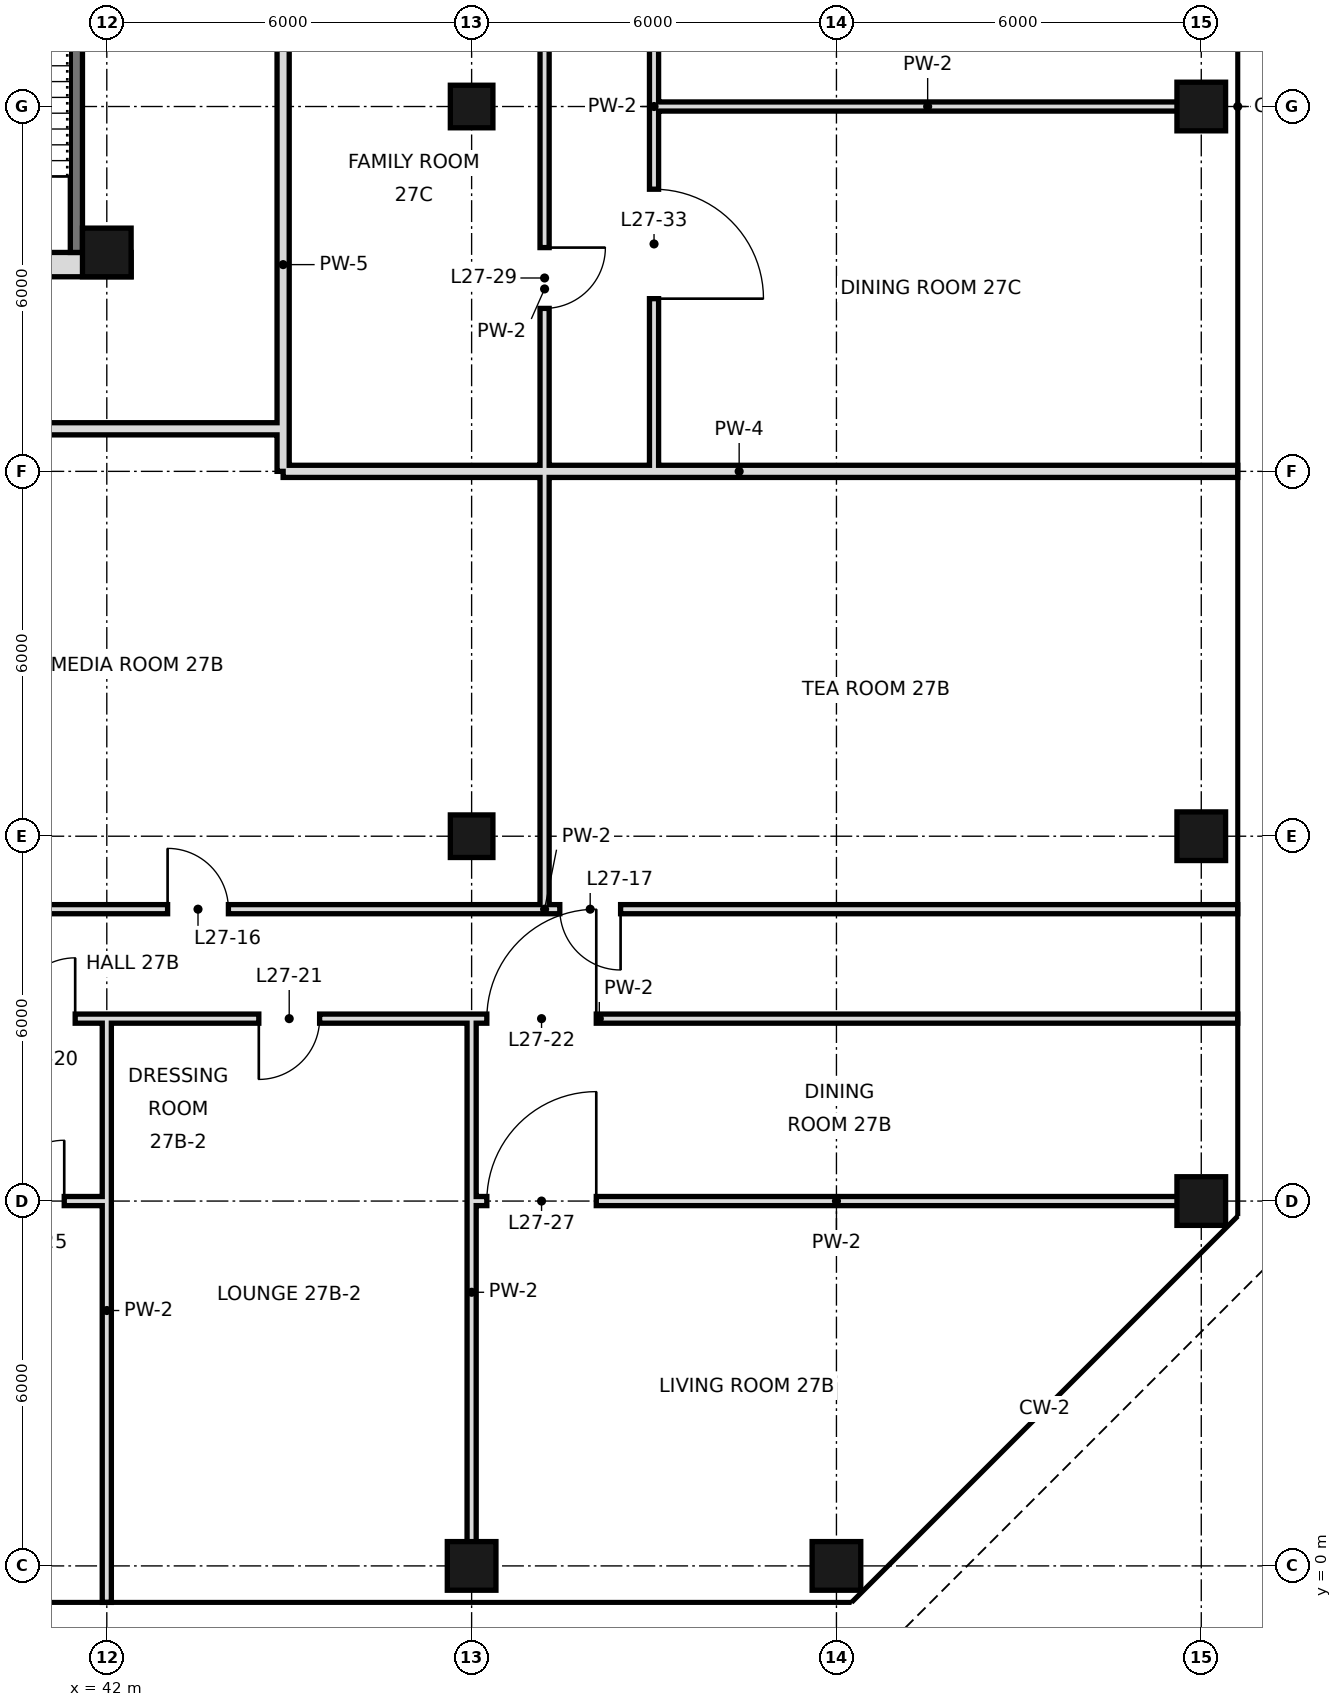
"""IFC4 building model, lengths in metres.
Left out: names, types, materials, properties, quantities, classifications, styles, units other than length and angle.
Written with IfcOpenShell. Run it as: python <this file> out.ifc"""

import sys

from ifc_helpers import new_model, si_unit, direction, frame, frame_2d, origin, origin_2d, place, context, subcontext, project, spatial, rectangle, hollow_rectangle, extrude, element, fill, save


model = new_model("IFC4")
c1 = context("Model", 3, precision=1e-05, world=origin(), true_north=direction((0.0, 1.0)))
c2 = subcontext(c1, "Body", "Model", "MODEL_VIEW")
j1 = project(units=[si_unit("LENGTHUNIT", "METRE"), si_unit("PLANEANGLEUNIT", "RADIAN")], contexts=[c1])
p1 = place(None, origin())
s1 = spatial("IfcSite", under=j1, at=p1, CompositionType="ELEMENT")
p2 = place(p1, origin())
s2 = spatial("IfcBuilding", under=s1, at=p2, CompositionType="ELEMENT")
p3 = place(p2, frame((0.0, 0.0, 123.2)))
s3 = spatial("IfcBuildingStorey", under=s2, at=p3, CompositionType="ELEMENT", Elevation=123.2)
p4 = place(p3, frame((42.0, 21.6, 0.0), z_axis=(0.0, 0.0, 1.0), x_axis=(1.0, 0.0, 0.0)))
e1 = element("IfcColumn", 1, at=p4, inside=s3, PredefinedType="COLUMN", context=c2, shape_type="SweptSolid", body=[
    extrude(hollow_rectangle(XDim=0.8, YDim=0.8, WallThickness=0.05, at=origin_2d()), origin(), (0.0, 0.0, 1.0), 3.6),
])
p5 = place(p3, frame((48.0, 0.0, 0.0), z_axis=(0.0, 0.0, 1.0), x_axis=(1.0, 0.0, 0.0)))
e2 = element("IfcColumn", 2, at=p5, inside=s3, PredefinedType="COLUMN", context=c2, shape_type="SweptSolid", body=[
    extrude(hollow_rectangle(XDim=0.8, YDim=0.8, WallThickness=0.04, at=origin_2d()), origin(), (0.0, 0.0, 1.0), 3.6),
])
for number, where, z_axis, x_axis in (
    (3, (48.0, 12.0, 0.0), (0.0, 0.0, 1.0), (1.0, 0.0, 0.0)),
    (4, (48.0, 24.0, 0.0), (0.0, 0.0, 1.0), (1.0, 0.0, 0.0)),
):
    element("IfcColumn", number, at=place(p3, frame(where, z_axis=z_axis, x_axis=x_axis)), inside=s3, PredefinedType="COLUMN", context=c2, shape_type="SweptSolid", body=[
        extrude(hollow_rectangle(XDim=0.7, YDim=0.7, WallThickness=0.036, at=origin_2d()), origin(), (0.0, 0.0, 1.0), 3.6),
    ])
for number, where, z_axis, x_axis in (
    (5, (54.0, 0.0, 0.0), (0.0, 0.0, 1.0), (1.0, 0.0, 0.0)),
    (6, (60.0, 6.0, 0.0), (0.0, 0.0, 1.0), (1.0, 0.0, 0.0)),
    (7, (60.0, 12.0, 0.0), (0.0, 0.0, 1.0), (1.0, 0.0, 0.0)),
    (8, (60.0, 24.0, 0.0), (0.0, 0.0, 1.0), (1.0, 0.0, 0.0)),
):
    element("IfcColumn", number, at=place(p3, frame(where, z_axis=z_axis, x_axis=x_axis)), inside=s3, PredefinedType="COLUMN", context=c2, shape_type="SweptSolid", body=[
        extrude(hollow_rectangle(XDim=0.8, YDim=0.8, WallThickness=0.04, at=origin_2d()), origin(), (0.0, 0.0, 1.0), 3.6),
    ])
p6 = place(p3, frame((42.0, -0.6, 0.0), z_axis=(0.0, 0.0, 1.0), x_axis=(0.0, 1.0, 0.0)))
e9 = element("IfcWall", 9, at=p6, inside=s3, PredefinedType="PARTITIONING", context=c2, shape_type="SweptSolid", body=[
    extrude(rectangle(XDim=9.6, YDim=0.15, at=frame_2d((4.8, 0.0))), origin(), (0.0, 0.0, 1.0), 2.72),
])
p7 = place(p3, frame((44.9, 18.7, 0.0), z_axis=(0.0, 0.0, 1.0), x_axis=(0.0, 1.0, 0.0)))
e10 = element("IfcWall", 10, at=p7, inside=s3, PredefinedType="SOLIDWALL", context=c2, shape_type="SweptSolid", body=[
    extrude(rectangle(XDim=14.9, YDim=0.2, at=frame_2d((7.45, 0.0))), origin(), (0.0, 0.0, 1.0), 2.97),
])
p8 = place(p7, frame((9.72, 0.0, 0.0)))
e11 = element("IfcOpeningElement", 11, at=p8, cuts=e10, PredefinedType="OPENING", context=c2, shape_type="SweptSolid", body=[
    extrude(rectangle(XDim=1.2, YDim=2.4, at=frame_2d((0.6, 1.2))), frame((0.0, 0.11, 0.0), z_axis=(0.0, -1.0, 0.0), x_axis=(1.0, 0.0, 0.0)), (0.0, 0.0, 1.0), 0.22),
])
p9 = place(p3, frame((44.9, 18.0, 0.0), z_axis=(0.0, 0.0, 1.0), x_axis=(0.0, 1.0, 0.0)))
e12 = element("IfcWall", 12, at=p9, inside=s3, PredefinedType="SOLIDWALL", context=c2, shape_type="SweptSolid", body=[
    extrude(rectangle(XDim=0.7, YDim=0.2, at=frame_2d((0.35, 0.0))), origin(), (0.0, 0.0, 1.0), 2.97),
])
p10 = place(p3, frame((48.0, 0.0, 0.0), z_axis=(0.0, 0.0, 1.0), x_axis=(0.0, 1.0, 0.0)))
e13 = element("IfcWall", 13, at=p10, inside=s3, PredefinedType="PARTITIONING", context=c2, shape_type="SweptSolid", body=[
    extrude(rectangle(XDim=9.0, YDim=0.15, at=frame_2d((4.5, 0.0))), origin(), (0.0, 0.0, 1.0), 2.72),
])
p11 = place(p3, frame((49.2, 10.8, 0.0), z_axis=(0.0, 0.0, 1.0), x_axis=(0.0, 1.0, 0.0)))
e14 = element("IfcWall", 14, at=p11, inside=s3, PredefinedType="PARTITIONING", context=c2, shape_type="SweptSolid", body=[
    extrude(rectangle(XDim=20.4, YDim=0.15, at=frame_2d((10.2, 0.0))), origin(), (0.0, 0.0, 1.0), 3.42),
])
p12 = place(p11, frame((17.68, 0.0, 0.0)))
e15 = element("IfcOpeningElement", 15, at=p12, cuts=e14, PredefinedType="OPENING", context=c2, shape_type="SweptSolid", body=[
    extrude(rectangle(XDim=1.0, YDim=2.4, at=frame_2d((0.5, 1.2))), frame((0.0, 0.085, 0.0), z_axis=(0.0, -1.0, 0.0), x_axis=(1.0, 0.0, 0.0)), (0.0, 0.0, 1.0), 0.17),
])
p13 = place(p11, frame((9.88, 0.0, 0.0)))
e16 = element("IfcOpeningElement", 16, at=p13, cuts=e14, PredefinedType="OPENING", context=c2, shape_type="SweptSolid", body=[
    extrude(rectangle(XDim=1.0, YDim=2.4, at=frame_2d((0.5, 1.2))), frame((0.0, 0.085, 0.0), z_axis=(0.0, -1.0, 0.0), x_axis=(1.0, 0.0, 0.0)), (0.0, 0.0, 1.0), 0.17),
])
p14 = place(p3, frame((51.0, 18.0, 0.0), z_axis=(0.0, 0.0, 1.0), x_axis=(0.0, 1.0, 0.0)))
e17 = element("IfcWall", 17, at=p14, inside=s3, PredefinedType="PARTITIONING", context=c2, shape_type="SweptSolid", body=[
    extrude(rectangle(XDim=12.0, YDim=0.15, at=frame_2d((6.0, 0.0))), origin(), (0.0, 0.0, 1.0), 3.42),
])
p15 = place(p14, frame((2.84, 0.0, 0.0)))
e18 = element("IfcOpeningElement", 18, at=p15, cuts=e17, PredefinedType="OPENING", context=c2, shape_type="SweptSolid", body=[
    extrude(rectangle(XDim=1.8, YDim=2.4, at=frame_2d((0.9, 1.2))), frame((0.0, 0.085, 0.0), z_axis=(0.0, -1.0, 0.0), x_axis=(1.0, 0.0, 0.0)), (0.0, 0.0, 1.0), 0.17),
])
p16 = place(p14, frame((8.1, 0.0, 0.0)))
e19 = element("IfcOpeningElement", 19, at=p16, cuts=e17, PredefinedType="OPENING", context=c2, shape_type="SweptSolid", body=[
    extrude(rectangle(XDim=1.8, YDim=2.4, at=frame_2d((0.9, 1.2))), frame((0.0, 0.085, 0.0), z_axis=(0.0, -1.0, 0.0), x_axis=(1.0, 0.0, 0.0)), (0.0, 0.0, 1.0), 0.17),
])
p17 = place(p3, frame((37.8, 10.8, 0.0), z_axis=(0.0, 0.0, 1.0), x_axis=(1.0, 0.0, 0.0)))
e20 = element("IfcWall", 20, at=p17, inside=s3, PredefinedType="PARTITIONING", context=c2, shape_type="SweptSolid", body=[
    extrude(rectangle(XDim=22.8, YDim=0.15, at=frame_2d((11.4, 0.0))), origin(), (0.0, 0.0, 1.0), 3.42),
])
p18 = place(p17, frame((5.2, 0.0, 0.0)))
e21 = element("IfcOpeningElement", 21, at=p18, cuts=e20, PredefinedType="OPENING", context=c2, shape_type="SweptSolid", body=[
    extrude(rectangle(XDim=1.0, YDim=2.4, at=frame_2d((0.5, 1.2))), frame((0.0, 0.085, 0.0), z_axis=(0.0, -1.0, 0.0), x_axis=(1.0, 0.0, 0.0)), (0.0, 0.0, 1.0), 0.17),
])
p19 = place(p17, frame((11.65, 0.0, 0.0)))
e22 = element("IfcOpeningElement", 22, at=p19, cuts=e20, PredefinedType="OPENING", context=c2, shape_type="SweptSolid", body=[
    extrude(rectangle(XDim=1.0, YDim=2.4, at=frame_2d((0.5, 1.2))), frame((0.0, 0.085, 0.0), z_axis=(0.0, -1.0, 0.0), x_axis=(1.0, 0.0, 0.0)), (0.0, 0.0, 1.0), 0.17),
])
p20 = place(p3, frame((44.9, 18.0, 0.0), z_axis=(0.0, 0.0, 1.0), x_axis=(1.0, 0.0, 0.0)))
e23 = element("IfcWall", 23, at=p20, inside=s3, PredefinedType="SOLIDWALL", context=c2, shape_type="SweptSolid", body=[
    extrude(rectangle(XDim=15.7, YDim=0.2, at=frame_2d((7.85, 0.0))), origin(), (0.0, 0.0, 1.0), 2.72),
])
p21 = place(p3, frame((35.4, 18.7, 0.0), z_axis=(0.0, 0.0, 1.0), x_axis=(1.0, 0.0, 0.0)))
e24 = element("IfcWall", 24, at=p21, inside=s3, PredefinedType="SOLIDWALL", context=c2, shape_type="SweptSolid", body=[
    extrude(rectangle(XDim=9.5, YDim=0.2, at=frame_2d((4.75, 0.0))), origin(), (0.0, 0.0, 1.0), 2.72),
])
p22 = place(p3, frame((51.0, 24.0, 0.0), z_axis=(0.0, 0.0, 1.0), x_axis=(1.0, 0.0, 0.0)))
e25 = element("IfcWall", 25, at=p22, inside=s3, PredefinedType="PARTITIONING", context=c2, shape_type="SweptSolid", body=[
    extrude(rectangle(XDim=9.0, YDim=0.15, at=frame_2d((4.5, 0.0))), origin(), (0.0, 0.0, 1.0), 2.72),
])
p23 = place(p3, frame((39.6, 6.0, 0.0), z_axis=(0.0, 0.0, 1.0), x_axis=(1.0, 0.0, 0.0)))
e26 = element("IfcWall", 26, at=p23, inside=s3, PredefinedType="PARTITIONING", context=c2, shape_type="SweptSolid", body=[
    extrude(rectangle(XDim=2.4, YDim=0.15, at=frame_2d((1.2, 0.0))), origin(), (0.0, 0.0, 1.0), 2.97),
])
p24 = place(p23, frame((0.7, 0.0, 0.0)))
e27 = element("IfcOpeningElement", 27, at=p24, cuts=e26, PredefinedType="OPENING", context=c2, shape_type="SweptSolid", body=[
    extrude(rectangle(XDim=1.0, YDim=2.4, at=frame_2d((0.5, 1.2))), frame((0.0, 0.085, 0.0), z_axis=(0.0, -1.0, 0.0), x_axis=(1.0, 0.0, 0.0)), (0.0, 0.0, 1.0), 0.17),
])
p25 = place(p3, frame((48.0, 6.0, 0.0), z_axis=(0.0, 0.0, 1.0), x_axis=(1.0, 0.0, 0.0)))
e28 = element("IfcWall", 28, at=p25, inside=s3, PredefinedType="PARTITIONING", context=c2, shape_type="SweptSolid", body=[
    extrude(rectangle(XDim=12.0, YDim=0.15, at=frame_2d((6.0, 0.0))), origin(), (0.0, 0.0, 1.0), 2.72),
])
p26 = place(p25, frame((0.25, 0.0, 0.0)))
e29 = element("IfcOpeningElement", 29, at=p26, cuts=e28, PredefinedType="OPENING", context=c2, shape_type="SweptSolid", body=[
    extrude(rectangle(XDim=1.8, YDim=2.4, at=frame_2d((0.9, 1.2))), frame((0.0, 0.085, 0.0), z_axis=(0.0, -1.0, 0.0), x_axis=(1.0, 0.0, 0.0)), (0.0, 0.0, 1.0), 0.17),
])
p27 = place(p3, frame((39.6, 9.0, 0.0), z_axis=(0.0, 0.0, 1.0), x_axis=(1.0, 0.0, 0.0)))
e30 = element("IfcWall", 30, at=p27, inside=s3, PredefinedType="PARTITIONING", context=c2, shape_type="SweptSolid", body=[
    extrude(rectangle(XDim=21.0, YDim=0.15, at=frame_2d((10.5, 0.0))), origin(), (0.0, 0.0, 1.0), 3.42),
])
p28 = place(p27, frame((0.88, 0.0, 0.0)))
e31 = element("IfcOpeningElement", 31, at=p28, cuts=e30, PredefinedType="OPENING", context=c2, shape_type="SweptSolid", body=[
    extrude(rectangle(XDim=1.0, YDim=2.4, at=frame_2d((0.5, 1.2))), frame((0.0, 0.085, 0.0), z_axis=(0.0, -1.0, 0.0), x_axis=(1.0, 0.0, 0.0)), (0.0, 0.0, 1.0), 0.17),
])
p29 = place(p27, frame((4.9, 0.0, 0.0)))
e32 = element("IfcOpeningElement", 32, at=p29, cuts=e30, PredefinedType="OPENING", context=c2, shape_type="SweptSolid", body=[
    extrude(rectangle(XDim=1.0, YDim=2.4, at=frame_2d((0.5, 1.2))), frame((0.0, 0.085, 0.0), z_axis=(0.0, -1.0, 0.0), x_axis=(1.0, 0.0, 0.0)), (0.0, 0.0, 1.0), 0.17),
])
p30 = place(p27, frame((8.65, 0.0, 0.0)))
e33 = element("IfcOpeningElement", 33, at=p30, cuts=e30, PredefinedType="OPENING", context=c2, shape_type="SweptSolid", body=[
    extrude(rectangle(XDim=1.8, YDim=2.4, at=frame_2d((0.9, 1.2))), frame((0.0, 0.085, 0.0), z_axis=(0.0, -1.0, 0.0), x_axis=(1.0, 0.0, 0.0)), (0.0, 0.0, 1.0), 0.17),
])
p31 = place(p3, frame((41.5, 21.6, 0.0), z_axis=(0.0, 0.0, 1.0), x_axis=(0.0, 1.0, 0.0)))
e34 = element("IfcWall", 34, at=p31, inside=s3, PredefinedType="SOLIDWALL", context=c2, shape_type="SweptSolid", body=[
    extrude(rectangle(XDim=23.5, YDim=0.2, at=frame_2d((11.75, 0.0))), origin(), (0.0, 0.0, 1.0), 3.42),
])
p32 = place(p3, frame((5.6, 21.4, 0.0), z_axis=(0.0, 0.0, 1.0), x_axis=(1.0, 0.0, 0.0)))
e35 = element("IfcWall", 35, at=p32, inside=s3, PredefinedType="SOLIDWALL", context=c2, shape_type="SweptSolid", body=[
    extrude(rectangle(XDim=36.8, YDim=0.4, at=frame_2d((18.4, 0.0))), origin(), (0.0, 0.0, 1.0), 3.42),
])
p33 = place(p32, frame((8.5, 0.0, 0.0)))
e36 = element("IfcOpeningElement", 36, at=p33, cuts=e35, PredefinedType="OPENING", context=c2, shape_type="SweptSolid", body=[
    extrude(rectangle(XDim=1.8, YDim=2.1, at=frame_2d((0.9, 1.05))), frame((0.0, 0.21, 0.0), z_axis=(0.0, -1.0, 0.0), x_axis=(1.0, 0.0, 0.0)), (0.0, 0.0, 1.0), 0.42),
])
p34 = place(p32, frame((17.5, 0.0, 0.0)))
e37 = element("IfcOpeningElement", 37, at=p34, cuts=e35, PredefinedType="OPENING", context=c2, shape_type="SweptSolid", body=[
    extrude(rectangle(XDim=1.8, YDim=2.1, at=frame_2d((0.9, 1.05))), frame((0.0, 0.21, 0.0), z_axis=(0.0, -1.0, 0.0), x_axis=(1.0, 0.0, 0.0)), (0.0, 0.0, 1.0), 0.42),
])
p35 = place(p32, frame((26.5, 0.0, 0.0)))
e38 = element("IfcOpeningElement", 38, at=p35, cuts=e35, PredefinedType="OPENING", context=c2, shape_type="SweptSolid", body=[
    extrude(rectangle(XDim=1.8, YDim=2.1, at=frame_2d((0.9, 1.05))), frame((0.0, 0.21, 0.0), z_axis=(0.0, -1.0, 0.0), x_axis=(1.0, 0.0, 0.0)), (0.0, 0.0, 1.0), 0.42),
])
p36 = place(p32, frame((4.5, 0.0, 0.0)))
e39 = element("IfcOpeningElement", 39, at=p36, cuts=e35, PredefinedType="OPENING", context=c2, shape_type="SweptSolid", body=[
    extrude(rectangle(XDim=1.2, YDim=2.1, at=frame_2d((0.6, 1.05))), frame((0.0, 0.21, 0.0), z_axis=(0.0, -1.0, 0.0), x_axis=(1.0, 0.0, 0.0)), (0.0, 0.0, 1.0), 0.42),
])
p37 = place(p32, frame((31.1, 0.0, 0.0)))
e40 = element("IfcOpeningElement", 40, at=p37, cuts=e35, PredefinedType="OPENING", context=c2, shape_type="SweptSolid", body=[
    extrude(rectangle(XDim=1.2, YDim=2.1, at=frame_2d((0.6, 1.05))), frame((0.0, 0.21, 0.0), z_axis=(0.0, -1.0, 0.0), x_axis=(1.0, 0.0, 0.0)), (0.0, 0.0, 1.0), 0.42),
])
p38 = place(p18, origin())
e41 = element("IfcDoor", 41, at=p38, inside=s3, OperationType="SINGLE_SWING_LEFT", PredefinedType="DOOR", context=c2, shape_type="SweptSolid", body=[
    extrude(rectangle(XDim=1.0, YDim=2.4, at=frame_2d((0.5, 1.2))), frame((0.0, 0.025, 0.0), z_axis=(0.0, -1.0, 0.0), x_axis=(1.0, 0.0, 0.0)), (0.0, 0.0, 1.0), 0.05),
])
fill(e21, e41)
p39 = place(p19, origin())
e42 = element("IfcDoor", 42, at=p39, inside=s3, OperationType="SINGLE_SWING_RIGHT", PredefinedType="DOOR", context=c2, shape_type="SweptSolid", body=[
    extrude(rectangle(XDim=1.0, YDim=2.4, at=frame_2d((0.5, 1.2))), frame((0.0, 0.025, 0.0), z_axis=(0.0, -1.0, 0.0), x_axis=(1.0, 0.0, 0.0)), (0.0, 0.0, 1.0), 0.05),
])
fill(e22, e42)
p40 = place(p28, frame((1.0, 0.0, 0.0), z_axis=(0.0, 0.0, 1.0), x_axis=(-1.0, 0.0, 0.0)))
e43 = element("IfcDoor", 43, at=p40, inside=s3, OperationType="SINGLE_SWING_LEFT", PredefinedType="DOOR", context=c2, shape_type="SweptSolid", body=[
    extrude(rectangle(XDim=1.0, YDim=2.4, at=frame_2d((0.5, 1.2))), frame((0.0, 0.025, 0.0), z_axis=(0.0, -1.0, 0.0), x_axis=(1.0, 0.0, 0.0)), (0.0, 0.0, 1.0), 0.05),
])
fill(e31, e43)
p41 = place(p29, frame((1.0, 0.0, 0.0), z_axis=(0.0, 0.0, 1.0), x_axis=(-1.0, 0.0, 0.0)))
e44 = element("IfcDoor", 44, at=p41, inside=s3, OperationType="SINGLE_SWING_RIGHT", PredefinedType="DOOR", context=c2, shape_type="SweptSolid", body=[
    extrude(rectangle(XDim=1.0, YDim=2.4, at=frame_2d((0.5, 1.2))), frame((0.0, 0.025, 0.0), z_axis=(0.0, -1.0, 0.0), x_axis=(1.0, 0.0, 0.0)), (0.0, 0.0, 1.0), 0.05),
])
fill(e32, e44)
p42 = place(p30, frame((1.8, 0.0, 0.0), z_axis=(0.0, 0.0, 1.0), x_axis=(-1.0, 0.0, 0.0)))
e45 = element("IfcDoor", 45, at=p42, inside=s3, OperationType="SINGLE_SWING_LEFT", PredefinedType="DOOR", context=c2, shape_type="SweptSolid", body=[
    extrude(rectangle(XDim=1.8, YDim=2.4, at=frame_2d((0.9, 1.2))), frame((0.0, 0.025, 0.0), z_axis=(0.0, -1.0, 0.0), x_axis=(1.0, 0.0, 0.0)), (0.0, 0.0, 1.0), 0.05),
])
fill(e33, e45)
p43 = place(p24, frame((1.0, 0.0, 0.0), z_axis=(0.0, 0.0, 1.0), x_axis=(-1.0, 0.0, 0.0)))
e46 = element("IfcDoor", 46, at=p43, inside=s3, OperationType="SINGLE_SWING_LEFT", PredefinedType="DOOR", context=c2, shape_type="SweptSolid", body=[
    extrude(rectangle(XDim=1.0, YDim=2.4, at=frame_2d((0.5, 1.2))), frame((0.0, 0.025, 0.0), z_axis=(0.0, -1.0, 0.0), x_axis=(1.0, 0.0, 0.0)), (0.0, 0.0, 1.0), 0.05),
])
fill(e27, e46)
p44 = place(p26, frame((1.8, 0.0, 0.0), z_axis=(0.0, 0.0, 1.0), x_axis=(-1.0, 0.0, 0.0)))
e47 = element("IfcDoor", 47, at=p44, inside=s3, OperationType="SINGLE_SWING_LEFT", PredefinedType="DOOR", context=c2, shape_type="SweptSolid", body=[
    extrude(rectangle(XDim=1.8, YDim=2.4, at=frame_2d((0.9, 1.2))), frame((0.0, 0.025, 0.0), z_axis=(0.0, -1.0, 0.0), x_axis=(1.0, 0.0, 0.0)), (0.0, 0.0, 1.0), 0.05),
])
fill(e29, e47)
p45 = place(p13, origin())
e48 = element("IfcDoor", 48, at=p45, inside=s3, OperationType="SINGLE_SWING_RIGHT", PredefinedType="DOOR", context=c2, shape_type="SweptSolid", body=[
    extrude(rectangle(XDim=1.0, YDim=2.4, at=frame_2d((0.5, 1.2))), frame((0.0, 0.025, 0.0), z_axis=(0.0, -1.0, 0.0), x_axis=(1.0, 0.0, 0.0)), (0.0, 0.0, 1.0), 0.05),
])
fill(e16, e48)
p46 = place(p15, frame((1.8, 0.0, 0.0), z_axis=(0.0, 0.0, 1.0), x_axis=(-1.0, 0.0, 0.0)))
e49 = element("IfcDoor", 49, at=p46, inside=s3, OperationType="SINGLE_SWING_RIGHT", PredefinedType="DOOR", context=c2, shape_type="SweptSolid", body=[
    extrude(rectangle(XDim=1.8, YDim=2.4, at=frame_2d((0.9, 1.2))), frame((0.0, 0.025, 0.0), z_axis=(0.0, -1.0, 0.0), x_axis=(1.0, 0.0, 0.0)), (0.0, 0.0, 1.0), 0.05),
])
fill(e18, e49)
save(model, sys.argv[1])
